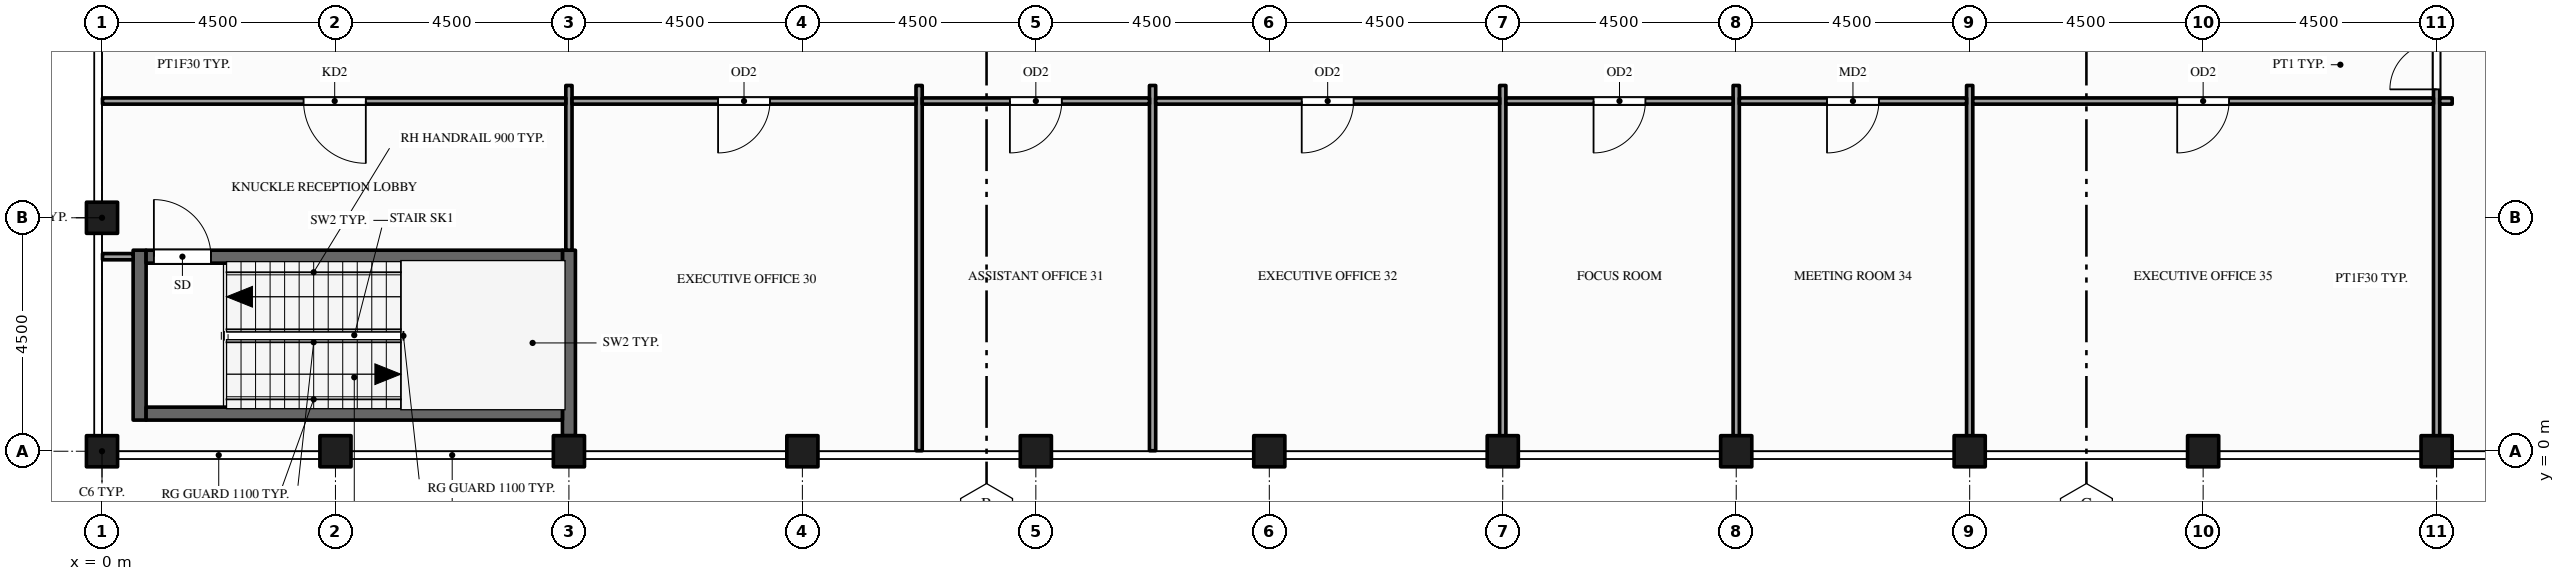
"""IFC4 building model, lengths in metres.
Left out: names, types, materials, properties, quantities, classifications, styles, units other than length and angle.
Written with IfcOpenShell. Run it as: python <this file> out.ifc"""

import sys

from ifc_helpers import new_model, si_unit, direction, frame, frame_2d, origin, origin_2d, place, context, subcontext, project, spatial, rectangle, hollow_rectangle, extrude, element, fill, save


model = new_model("IFC4")
c1 = context("Model", 3, precision=1e-05, world=origin(), true_north=direction((0.0, 1.0)))
c2 = subcontext(c1, "Body", "Model", "MODEL_VIEW")
j1 = project(units=[si_unit("LENGTHUNIT", "METRE"), si_unit("PLANEANGLEUNIT", "RADIAN")], contexts=[c1])
p1 = place(None, origin())
s1 = spatial("IfcSite", under=j1, at=p1, CompositionType="ELEMENT")
p2 = place(p1, origin())
s2 = spatial("IfcBuilding", under=s1, at=p2, CompositionType="ELEMENT")
p3 = place(p2, frame((0.0, 0.0, 336.5)))
s3 = spatial("IfcBuildingStorey", under=s2, at=p3, CompositionType="ELEMENT", Elevation=336.5)
for number, where, z_axis, x_axis in (
    (1, (0.0, 0.0, -0.15), (0.0, 0.0, 1.0), (1.0, 0.0, 0.0)),
    (2, (0.0, 4.5, -0.15), (0.0, 0.0, 1.0), (1.0, 0.0, 0.0)),
    (3, (4.5, 0.0, -0.15), (0.0, 0.0, 1.0), (1.0, 0.0, 0.0)),
    (4, (9.0, 0.0, -0.15), (0.0, 0.0, 1.0), (1.0, 0.0, 0.0)),
    (5, (13.5, 0.0, -0.15), (0.0, 0.0, 1.0), (1.0, 0.0, 0.0)),
    (6, (18.0, 0.0, -0.15), (0.0, 0.0, 1.0), (1.0, 0.0, 0.0)),
    (7, (22.5, 0.0, -0.15), (0.0, 0.0, 1.0), (1.0, 0.0, 0.0)),
    (8, (27.0, 0.0, -0.15), (0.0, 0.0, 1.0), (1.0, 0.0, 0.0)),
    (9, (31.5, 0.0, -0.15), (0.0, 0.0, 1.0), (1.0, 0.0, 0.0)),
    (10, (36.0, 0.0, -0.15), (0.0, 0.0, 1.0), (1.0, 0.0, 0.0)),
    (11, (40.5, 0.0, -0.15), (0.0, 0.0, 1.0), (1.0, 0.0, 0.0)),
    (12, (45.0, 0.0, -0.15), (0.0, 0.0, 1.0), (1.0, 0.0, 0.0)),
):
    element("IfcColumn", number, at=place(p3, frame(where, z_axis=z_axis, x_axis=x_axis)), inside=s3, PredefinedType="COLUMN", context=c2, shape_type="SweptSolid", body=[
        extrude(hollow_rectangle(XDim=0.6, YDim=0.6, WallThickness=0.03, at=origin_2d()), origin(), (0.0, 0.0, 1.0), 4.5),
    ])
p4 = place(p3, frame((0.725, 0.6, 0.0), z_axis=(0.0, 0.0, 1.0), x_axis=(0.0, 1.0, 0.0)))
e13 = element("IfcWall", 13, at=p4, inside=s3, PredefinedType="SHEAR", context=c2, shape_type="SweptSolid", body=[
    extrude(rectangle(XDim=3.275, YDim=0.25, at=frame_2d((1.637, 0.0))), origin(), (0.0, 0.0, 1.0), 4.35),
])
p5 = place(p3, frame((9.0, 0.3, 0.0), z_axis=(0.0, 0.0, 1.0), x_axis=(0.0, 1.0, 0.0)))
e14 = element("IfcWall", 14, at=p5, inside=s3, PredefinedType="SHEAR", context=c2, shape_type="SweptSolid", body=[
    extrude(rectangle(XDim=3.575, YDim=0.25, at=frame_2d((1.788, 0.0))), origin(), (0.0, 0.0, 1.0), 4.35),
])
p6 = place(p3, frame((9.0, 3.875, 0.0), z_axis=(0.0, 0.0, 1.0), x_axis=(0.0, 1.0, 0.0)))
e15 = element("IfcWall", 15, at=p6, inside=s3, PredefinedType="PARTITIONING", context=c2, shape_type="SweptSolid", body=[
    extrude(rectangle(XDim=3.175, YDim=0.12, at=frame_2d((1.587, 0.0))), origin(), (0.0, 0.0, 1.0), 3.359),
])
for number, where, z_axis, x_axis in (
    (16, (15.75, 0.01, 0.0), (0.0, 0.0, 1.0), (0.0, 1.0, 0.0)),
    (17, (20.25, 0.01, 0.0), (0.0, 0.0, 1.0), (0.0, 1.0, 0.0)),
    (18, (27.0, 0.01, 0.0), (0.0, 0.0, 1.0), (0.0, 1.0, 0.0)),
    (19, (31.5, 0.01, 0.0), (0.0, 0.0, 1.0), (0.0, 1.0, 0.0)),
    (20, (36.0, 0.01, 0.0), (0.0, 0.0, 1.0), (0.0, 1.0, 0.0)),
):
    element("IfcWall", number, at=place(p3, frame(where, z_axis=z_axis, x_axis=x_axis)), inside=s3, PredefinedType="PARTITIONING", context=c2, shape_type="SweptSolid", body=[
        extrude(rectangle(XDim=7.04, YDim=0.12, at=frame_2d((3.52, 0.0))), origin(), (0.0, 0.0, 1.0), 3.359),
    ])
p7 = place(p3, frame((45.0, 0.01, 0.0), z_axis=(0.0, 0.0, 1.0), x_axis=(0.0, 1.0, 0.0)))
e21 = element("IfcWall", 21, at=p7, inside=s3, PredefinedType="PARTITIONING", context=c2, shape_type="SweptSolid", body=[
    extrude(rectangle(XDim=22.48, YDim=0.12, at=frame_2d((11.24, 0.0))), origin(), (0.0, 0.0, 1.0), 3.359),
])
p8 = place(p7, frame((6.965, 0.0, 0.0)))
e22 = element("IfcOpeningElement", 22, at=p8, cuts=e21, PredefinedType="OPENING", context=c2, shape_type="SweptSolid", body=[
    extrude(rectangle(XDim=1.8, YDim=2.1, at=frame_2d((0.9, 1.05))), frame((0.0, 0.07, 0.0), z_axis=(0.0, -1.0, 0.0), x_axis=(1.0, 0.0, 0.0)), (0.0, 0.0, 1.0), 0.14),
])
p9 = place(p7, frame((9.99, 0.0, 0.0)))
e23 = element("IfcOpeningElement", 23, at=p9, cuts=e21, PredefinedType="OPENING", context=c2, shape_type="SweptSolid", body=[
    extrude(rectangle(XDim=0.9, YDim=2.1, at=frame_2d((0.45, 1.05))), frame((0.0, 0.07, 0.0), z_axis=(0.0, -1.0, 0.0), x_axis=(1.0, 0.0, 0.0)), (0.0, 0.0, 1.0), 0.14),
])
p10 = place(p7, frame((15.29, 0.0, 0.0)))
e24 = element("IfcOpeningElement", 24, at=p10, cuts=e21, PredefinedType="OPENING", context=c2, shape_type="SweptSolid", body=[
    extrude(rectangle(XDim=0.9, YDim=2.1, at=frame_2d((0.45, 1.05))), frame((0.0, 0.07, 0.0), z_axis=(0.0, -1.0, 0.0), x_axis=(1.0, 0.0, 0.0)), (0.0, 0.0, 1.0), 0.14),
])
p11 = place(p7, frame((20.49, 0.0, 0.0)))
e25 = element("IfcOpeningElement", 25, at=p11, cuts=e21, PredefinedType="OPENING", context=c2, shape_type="SweptSolid", body=[
    extrude(rectangle(XDim=1.0, YDim=2.1, at=frame_2d((0.5, 1.05))), frame((0.0, 0.07, 0.0), z_axis=(0.0, -1.0, 0.0), x_axis=(1.0, 0.0, 0.0)), (0.0, 0.0, 1.0), 0.14),
])
p12 = place(p3, frame((0.85, 0.725, 0.0), z_axis=(0.0, 0.0, 1.0), x_axis=(1.0, 0.0, 0.0)))
e26 = element("IfcWall", 26, at=p12, inside=s3, PredefinedType="SHEAR", context=c2, shape_type="SweptSolid", body=[
    extrude(rectangle(XDim=8.025, YDim=0.25, at=frame_2d((4.012, 0.0))), origin(), (0.0, 0.0, 1.0), 4.35),
])
p13 = place(p3, frame((0.01, 3.75, 0.0), z_axis=(0.0, 0.0, 1.0), x_axis=(1.0, 0.0, 0.0)))
e27 = element("IfcWall", 27, at=p13, inside=s3, PredefinedType="PARTITIONING", context=c2, shape_type="SweptSolid", body=[
    extrude(rectangle(XDim=0.59, YDim=0.12, at=frame_2d((0.295, 0.0))), origin(), (0.0, 0.0, 1.0), 3.672),
])
p14 = place(p3, frame((0.85, 3.75, 0.0), z_axis=(0.0, 0.0, 1.0), x_axis=(1.0, 0.0, 0.0)))
e28 = element("IfcWall", 28, at=p14, inside=s3, PredefinedType="SHEAR", context=c2, shape_type="SweptSolid", body=[
    extrude(rectangle(XDim=8.025, YDim=0.25, at=frame_2d((4.012, 0.0))), origin(), (0.0, 0.0, 1.0), 4.35),
])
p15 = place(p14, frame((0.15, 0.0, 0.0)))
e29 = element("IfcOpeningElement", 29, at=p15, cuts=e28, PredefinedType="OPENING", context=c2, shape_type="SweptSolid", body=[
    extrude(rectangle(XDim=1.1, YDim=2.1, at=frame_2d((0.55, 1.05))), frame((0.0, 0.135, 0.0), z_axis=(0.0, -1.0, 0.0), x_axis=(1.0, 0.0, 0.0)), (0.0, 0.0, 1.0), 0.27),
])
p16 = place(p3, frame((0.01, 6.75, 0.0), z_axis=(0.0, 0.0, 1.0), x_axis=(1.0, 0.0, 0.0)))
e30 = element("IfcWall", 30, at=p16, inside=s3, PredefinedType="PARTITIONING", context=c2, shape_type="SweptSolid", body=[
    extrude(rectangle(XDim=8.93, YDim=0.12, at=frame_2d((4.465, 0.0))), origin(), (0.0, 0.0, 1.0), 3.359),
])
p17 = place(p16, frame((3.875, 0.0, 0.0)))
e31 = element("IfcOpeningElement", 31, at=p17, cuts=e30, PredefinedType="OPENING", context=c2, shape_type="SweptSolid", body=[
    extrude(rectangle(XDim=1.2, YDim=2.1, at=frame_2d((0.6, 1.05))), frame((0.0, 0.07, 0.0), z_axis=(0.0, -1.0, 0.0), x_axis=(1.0, 0.0, 0.0)), (0.0, 0.0, 1.0), 0.14),
])
p18 = place(p3, frame((9.06, 6.75, 0.0), z_axis=(0.0, 0.0, 1.0), x_axis=(1.0, 0.0, 0.0)))
e32 = element("IfcWall", 32, at=p18, inside=s3, PredefinedType="PARTITIONING", context=c2, shape_type="SweptSolid", body=[
    extrude(rectangle(XDim=6.63, YDim=0.12, at=frame_2d((3.315, 0.0))), origin(), (0.0, 0.0, 1.0), 3.359),
])
p19 = place(p18, frame((2.815, 0.0, 0.0)))
e33 = element("IfcOpeningElement", 33, at=p19, cuts=e32, PredefinedType="OPENING", context=c2, shape_type="SweptSolid", body=[
    extrude(rectangle(XDim=1.0, YDim=2.1, at=frame_2d((0.5, 1.05))), frame((0.0, 0.07, 0.0), z_axis=(0.0, -1.0, 0.0), x_axis=(1.0, 0.0, 0.0)), (0.0, 0.0, 1.0), 0.14),
])
p20 = place(p3, frame((15.81, 6.75, 0.0), z_axis=(0.0, 0.0, 1.0), x_axis=(1.0, 0.0, 0.0)))
e34 = element("IfcWall", 34, at=p20, inside=s3, PredefinedType="PARTITIONING", context=c2, shape_type="SweptSolid", body=[
    extrude(rectangle(XDim=4.38, YDim=0.12, at=frame_2d((2.19, 0.0))), origin(), (0.0, 0.0, 1.0), 3.359),
])
p21 = place(p20, frame((1.69, 0.0, 0.0)))
e35 = element("IfcOpeningElement", 35, at=p21, cuts=e34, PredefinedType="OPENING", context=c2, shape_type="SweptSolid", body=[
    extrude(rectangle(XDim=1.0, YDim=2.1, at=frame_2d((0.5, 1.05))), frame((0.0, 0.07, 0.0), z_axis=(0.0, -1.0, 0.0), x_axis=(1.0, 0.0, 0.0)), (0.0, 0.0, 1.0), 0.14),
])
p22 = place(p3, frame((20.31, 6.75, 0.0), z_axis=(0.0, 0.0, 1.0), x_axis=(1.0, 0.0, 0.0)))
e36 = element("IfcWall", 36, at=p22, inside=s3, PredefinedType="PARTITIONING", context=c2, shape_type="SweptSolid", body=[
    extrude(rectangle(XDim=6.63, YDim=0.12, at=frame_2d((3.315, 0.0))), origin(), (0.0, 0.0, 1.0), 3.359),
])
p23 = place(p22, frame((2.815, 0.0, 0.0)))
e37 = element("IfcOpeningElement", 37, at=p23, cuts=e36, PredefinedType="OPENING", context=c2, shape_type="SweptSolid", body=[
    extrude(rectangle(XDim=1.0, YDim=2.1, at=frame_2d((0.5, 1.05))), frame((0.0, 0.07, 0.0), z_axis=(0.0, -1.0, 0.0), x_axis=(1.0, 0.0, 0.0)), (0.0, 0.0, 1.0), 0.14),
])
p24 = place(p3, frame((27.06, 6.75, 0.0), z_axis=(0.0, 0.0, 1.0), x_axis=(1.0, 0.0, 0.0)))
e38 = element("IfcWall", 38, at=p24, inside=s3, PredefinedType="PARTITIONING", context=c2, shape_type="SweptSolid", body=[
    extrude(rectangle(XDim=4.38, YDim=0.12, at=frame_2d((2.19, 0.0))), origin(), (0.0, 0.0, 1.0), 3.359),
])
p25 = place(p24, frame((1.69, 0.0, 0.0)))
e39 = element("IfcOpeningElement", 39, at=p25, cuts=e38, PredefinedType="OPENING", context=c2, shape_type="SweptSolid", body=[
    extrude(rectangle(XDim=1.0, YDim=2.1, at=frame_2d((0.5, 1.05))), frame((0.0, 0.07, 0.0), z_axis=(0.0, -1.0, 0.0), x_axis=(1.0, 0.0, 0.0)), (0.0, 0.0, 1.0), 0.14),
])
p26 = place(p3, frame((31.56, 6.75, 0.0), z_axis=(0.0, 0.0, 1.0), x_axis=(1.0, 0.0, 0.0)))
e40 = element("IfcWall", 40, at=p26, inside=s3, PredefinedType="PARTITIONING", context=c2, shape_type="SweptSolid", body=[
    extrude(rectangle(XDim=4.38, YDim=0.12, at=frame_2d((2.19, 0.0))), origin(), (0.0, 0.0, 1.0), 3.359),
])
p27 = place(p26, frame((1.69, 0.0, 0.0)))
e41 = element("IfcOpeningElement", 41, at=p27, cuts=e40, PredefinedType="OPENING", context=c2, shape_type="SweptSolid", body=[
    extrude(rectangle(XDim=1.0, YDim=2.1, at=frame_2d((0.5, 1.05))), frame((0.0, 0.07, 0.0), z_axis=(0.0, -1.0, 0.0), x_axis=(1.0, 0.0, 0.0)), (0.0, 0.0, 1.0), 0.14),
])
p28 = place(p3, frame((36.06, 6.75, 0.0), z_axis=(0.0, 0.0, 1.0), x_axis=(1.0, 0.0, 0.0)))
e42 = element("IfcWall", 42, at=p28, inside=s3, PredefinedType="PARTITIONING", context=c2, shape_type="SweptSolid", body=[
    extrude(rectangle(XDim=8.88, YDim=0.12, at=frame_2d((4.44, 0.0))), origin(), (0.0, 0.0, 1.0), 3.359),
])
p29 = place(p28, frame((3.94, 0.0, 0.0)))
e43 = element("IfcOpeningElement", 43, at=p29, cuts=e42, PredefinedType="OPENING", context=c2, shape_type="SweptSolid", body=[
    extrude(rectangle(XDim=1.0, YDim=2.1, at=frame_2d((0.5, 1.05))), frame((0.0, 0.07, 0.0), z_axis=(0.0, -1.0, 0.0), x_axis=(1.0, 0.0, 0.0)), (0.0, 0.0, 1.0), 0.14),
])
p30 = place(p3, frame((45.06, 6.75, 0.0), z_axis=(0.0, 0.0, 1.0), x_axis=(1.0, 0.0, 0.0)))
e44 = element("IfcWall", 44, at=p30, inside=s3, PredefinedType="PARTITIONING", context=c2, shape_type="SweptSolid", body=[
    extrude(rectangle(XDim=0.24, YDim=0.12, at=frame_2d((0.12, 0.0))), origin(), (0.0, 0.0, 1.0), 3.359),
])
p31 = place(p8, origin())
e45 = element("IfcDoor", 45, at=p31, inside=s3, OperationType="DOUBLE_DOOR_SINGLE_SWING", PredefinedType="DOOR", context=c2, shape_type="SweptSolid", body=[
    extrude(rectangle(XDim=1.8, YDim=2.1, at=frame_2d((0.9, 1.05))), frame((0.0, 0.025, 0.0), z_axis=(0.0, -1.0, 0.0), x_axis=(1.0, 0.0, 0.0)), (0.0, 0.0, 1.0), 0.05),
])
fill(e22, e45)
p32 = place(p15, origin())
e46 = element("IfcDoor", 46, at=p32, inside=s3, OperationType="SINGLE_SWING_LEFT", PredefinedType="DOOR", context=c2, shape_type="SweptSolid", body=[
    extrude(rectangle(XDim=1.1, YDim=2.1, at=frame_2d((0.55, 1.05))), frame((0.0, 0.025, 0.0), z_axis=(0.0, -1.0, 0.0), x_axis=(1.0, 0.0, 0.0)), (0.0, 0.0, 1.0), 0.05),
])
fill(e29, e46)
p33 = place(p17, origin())
e47 = element("IfcDoor", 47, at=p33, inside=s3, OperationType="SINGLE_SWING_RIGHT", PredefinedType="DOOR", context=c2, shape_type="SweptSolid", body=[
    extrude(rectangle(XDim=1.2, YDim=2.1, at=frame_2d((0.6, 1.05))), frame((0.0, 0.025, 0.0), z_axis=(0.0, -1.0, 0.0), x_axis=(1.0, 0.0, 0.0)), (0.0, 0.0, 1.0), 0.05),
])
fill(e31, e47)
p34 = place(p19, origin())
e48 = element("IfcDoor", 48, at=p34, inside=s3, OperationType="SINGLE_SWING_LEFT", PredefinedType="DOOR", context=c2, shape_type="SweptSolid", body=[
    extrude(rectangle(XDim=1.0, YDim=2.1, at=frame_2d((0.5, 1.05))), frame((0.0, 0.025, 0.0), z_axis=(0.0, -1.0, 0.0), x_axis=(1.0, 0.0, 0.0)), (0.0, 0.0, 1.0), 0.05),
])
fill(e33, e48)
p35 = place(p21, origin())
e49 = element("IfcDoor", 49, at=p35, inside=s3, OperationType="SINGLE_SWING_LEFT", PredefinedType="DOOR", context=c2, shape_type="SweptSolid", body=[
    extrude(rectangle(XDim=1.0, YDim=2.1, at=frame_2d((0.5, 1.05))), frame((0.0, 0.025, 0.0), z_axis=(0.0, -1.0, 0.0), x_axis=(1.0, 0.0, 0.0)), (0.0, 0.0, 1.0), 0.05),
])
fill(e35, e49)
p36 = place(p23, origin())
e50 = element("IfcDoor", 50, at=p36, inside=s3, OperationType="SINGLE_SWING_LEFT", PredefinedType="DOOR", context=c2, shape_type="SweptSolid", body=[
    extrude(rectangle(XDim=1.0, YDim=2.1, at=frame_2d((0.5, 1.05))), frame((0.0, 0.025, 0.0), z_axis=(0.0, -1.0, 0.0), x_axis=(1.0, 0.0, 0.0)), (0.0, 0.0, 1.0), 0.05),
])
fill(e37, e50)
p37 = place(p25, origin())
e51 = element("IfcDoor", 51, at=p37, inside=s3, OperationType="SINGLE_SWING_LEFT", PredefinedType="DOOR", context=c2, shape_type="SweptSolid", body=[
    extrude(rectangle(XDim=1.0, YDim=2.1, at=frame_2d((0.5, 1.05))), frame((0.0, 0.025, 0.0), z_axis=(0.0, -1.0, 0.0), x_axis=(1.0, 0.0, 0.0)), (0.0, 0.0, 1.0), 0.05),
])
fill(e39, e51)
p38 = place(p27, origin())
e52 = element("IfcDoor", 52, at=p38, inside=s3, OperationType="SINGLE_SWING_LEFT", PredefinedType="DOOR", context=c2, shape_type="SweptSolid", body=[
    extrude(rectangle(XDim=1.0, YDim=2.1, at=frame_2d((0.5, 1.05))), frame((0.0, 0.025, 0.0), z_axis=(0.0, -1.0, 0.0), x_axis=(1.0, 0.0, 0.0)), (0.0, 0.0, 1.0), 0.05),
])
fill(e41, e52)
p39 = place(p29, origin())
e53 = element("IfcDoor", 53, at=p39, inside=s3, OperationType="SINGLE_SWING_LEFT", PredefinedType="DOOR", context=c2, shape_type="SweptSolid", body=[
    extrude(rectangle(XDim=1.0, YDim=2.1, at=frame_2d((0.5, 1.05))), frame((0.0, 0.025, 0.0), z_axis=(0.0, -1.0, 0.0), x_axis=(1.0, 0.0, 0.0)), (0.0, 0.0, 1.0), 0.05),
])
fill(e43, e53)
save(model, sys.argv[1])
